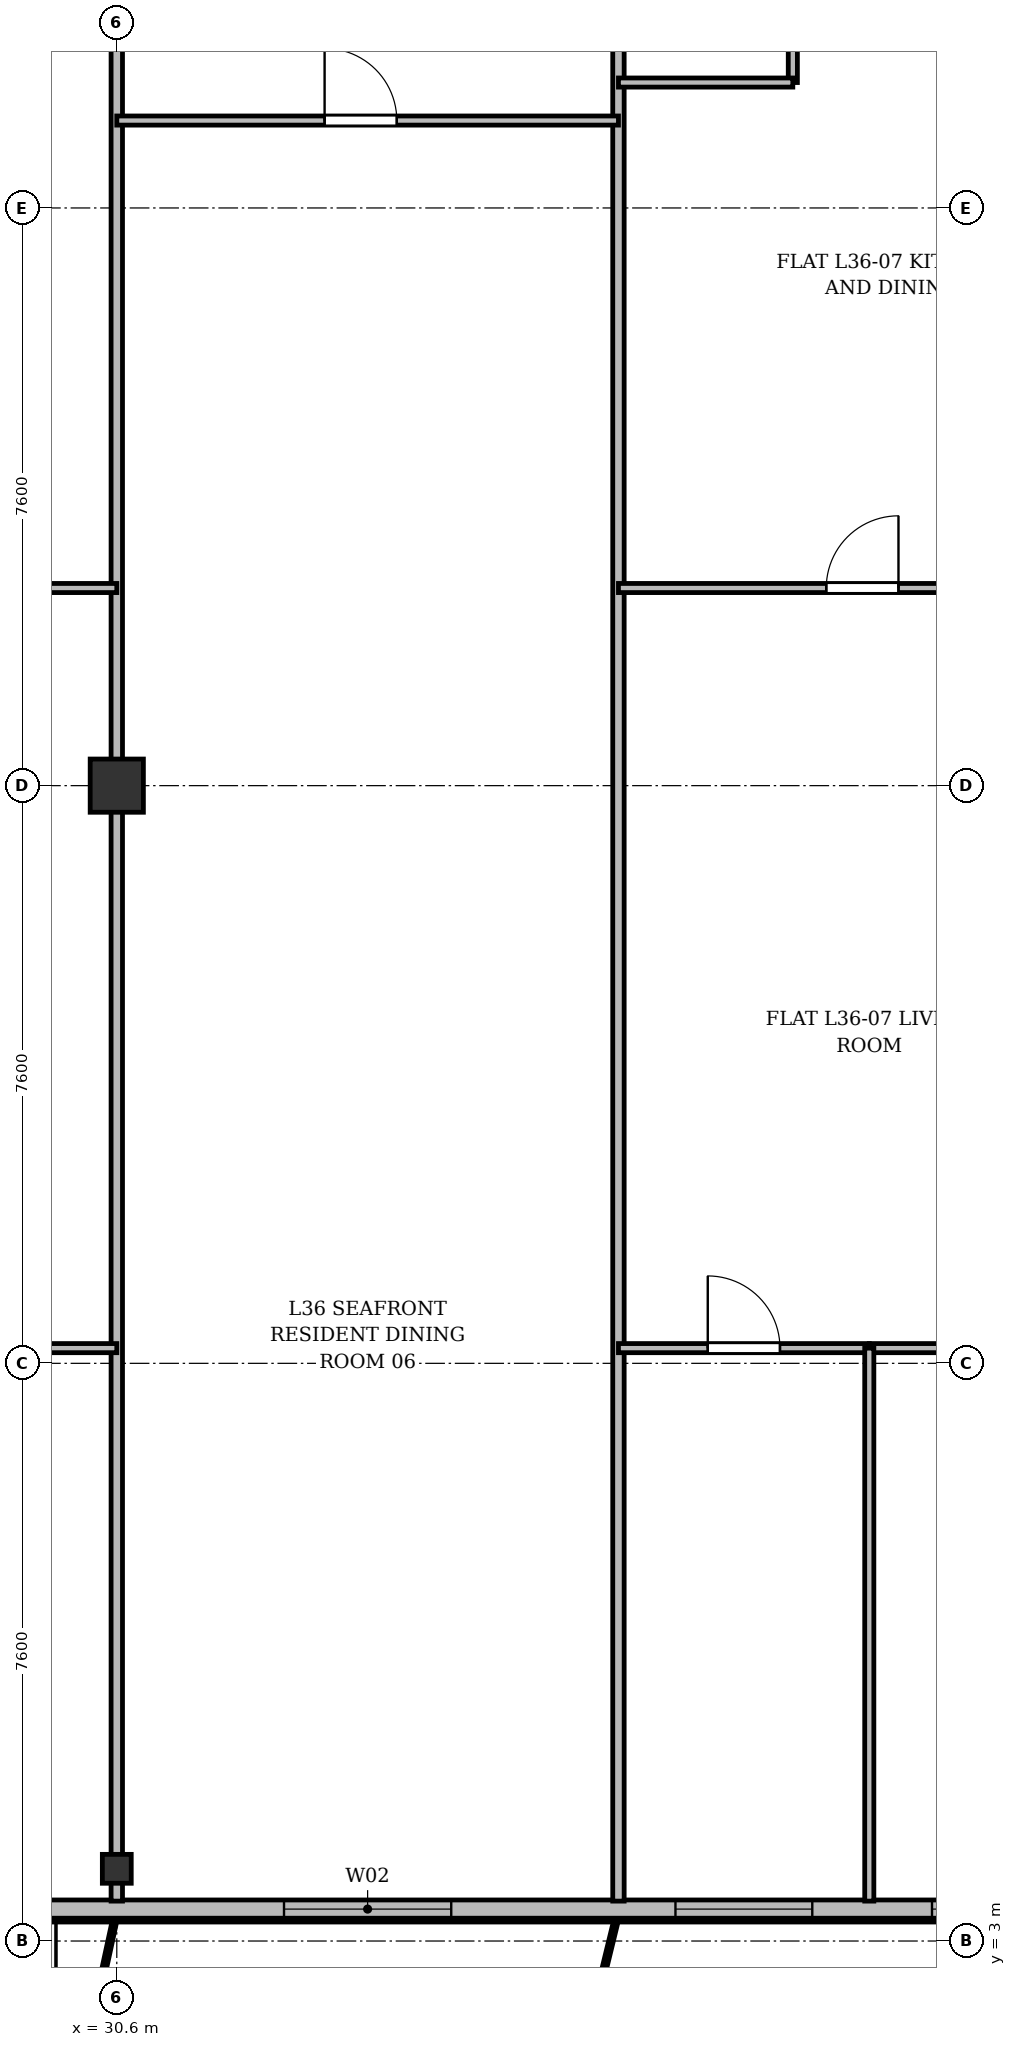
"""IFC4 building model, lengths in metres.
Left out: names, types, materials, properties, quantities, classifications, styles, units other than length and angle.
Written with IfcOpenShell. Run it as: python <this file> out.ifc"""

import sys

from ifc_helpers import new_model, si_unit, direction, frame, frame_2d, origin, origin_2d, place, context, subcontext, project, spatial, rectangle, i_section, extrude, source, transform, mapped, element, fill, save


model = new_model("IFC4")
c1 = context("Model", 3, precision=1e-05, world=origin(), true_north=direction((0.0, 1.0)))
c2 = subcontext(c1, "Body", "Model", "MODEL_VIEW")
j1 = project(units=[si_unit("LENGTHUNIT", "METRE"), si_unit("PLANEANGLEUNIT", "RADIAN")], contexts=[c1])
p1 = place(None, origin())
s1 = spatial("IfcSite", under=j1, at=p1, CompositionType="ELEMENT")
p2 = place(p1, origin())
s2 = spatial("IfcBuilding", under=s1, at=p2, CompositionType="ELEMENT")
p3 = place(p2, frame((0.0, 0.0, 139.3)))
s3 = spatial("IfcBuildingStorey", under=s2, at=p3, CompositionType="ELEMENT", Elevation=139.3)
m1 = source(origin(), c2, "Body", "SweptSolid", [
    extrude(i_section(OverallWidth=0.38, OverallDepth=0.38, WebThickness=0.02, FlangeThickness=0.03, at=origin_2d()), origin(), (0.0, 0.0, 1.0), 3.6),
])
p4 = place(p3, frame((30.6, 3.95, 0.0), z_axis=(0.0, 0.0, 1.0), x_axis=(1.0, 0.0, 0.0)))
e1 = element("IfcColumn", 1, at=p4, inside=s3, PredefinedType="COLUMN", context=c2, shape_type="MappedRepresentation", body=[
    mapped(m1, transform((0.0, 0.0, 0.0), x_axis=(1.0, 0.0, 0.0), y_axis=(0.0, 1.0, 0.0), z_axis=(0.0, 0.0, 1.0), scale=1.0)),
])
m2 = source(origin(), c2, "Body", "SweptSolid", [
    extrude(rectangle(XDim=0.7, YDim=0.7, at=origin_2d()), origin(), (0.0, 0.0, 1.0), 3.6),
])
p5 = place(p3, frame((30.6, 18.2, 0.0), z_axis=(0.0, 0.0, 1.0), x_axis=(1.0, 0.0, 0.0)))
e2 = element("IfcColumn", 2, at=p5, inside=s3, PredefinedType="COLUMN", context=c2, shape_type="MappedRepresentation", body=[
    mapped(m2, transform((0.0, 0.0, 0.0), x_axis=(1.0, 0.0, 0.0), y_axis=(0.0, 1.0, 0.0), z_axis=(0.0, 0.0, 1.0), scale=1.0)),
])
p6 = place(p3, frame((63.6, 3.42, 0.0), z_axis=(0.0, 0.0, 1.0), x_axis=(-1.0, 0.0, 0.0)))
e3 = element("IfcWall", 3, at=p6, inside=s3, PredefinedType="SOLIDWALL", context=c2, shape_type="SweptSolid", body=[
    extrude(rectangle(XDim=52.8, YDim=0.24, at=frame_2d((26.4, 0.0))), origin(), (0.0, 0.0, 1.0), 3.35),
])
p7 = place(p6, frame((0.495, 0.0, 0.9)))
e4 = element("IfcOpeningElement", 4, at=p7, cuts=e3, PredefinedType="OPENING", context=c2, shape_type="SweptSolid", body=[
    extrude(rectangle(XDim=1.5, YDim=1.75, at=frame_2d((0.75, 0.875))), frame((0.0, 0.13, 0.0), z_axis=(0.0, -1.0, 0.0), x_axis=(1.0, 0.0, 0.0)), (0.0, 0.0, 1.0), 0.26),
])
p8 = place(p6, frame((2.9, 0.0, 0.9)))
e5 = element("IfcOpeningElement", 5, at=p8, cuts=e3, PredefinedType="OPENING", context=c2, shape_type="SweptSolid", body=[
    extrude(rectangle(XDim=1.5, YDim=1.75, at=frame_2d((0.75, 0.875))), frame((0.0, 0.13, 0.0), z_axis=(0.0, -1.0, 0.0), x_axis=(1.0, 0.0, 0.0)), (0.0, 0.0, 1.0), 0.26),
])
p9 = place(p6, frame((5.902, 0.0, 0.0)))
e6 = element("IfcOpeningElement", 6, at=p9, cuts=e3, PredefinedType="OPENING", context=c2, shape_type="SweptSolid", body=[
    extrude(rectangle(XDim=1.2, YDim=2.2, at=frame_2d((0.6, 1.1))), frame((0.0, 0.13, 0.0), z_axis=(0.0, -1.0, 0.0), x_axis=(1.0, 0.0, 0.0)), (0.0, 0.0, 1.0), 0.26),
])
p10 = place(p6, frame((7.65, 0.0, 0.9)))
e7 = element("IfcOpeningElement", 7, at=p10, cuts=e3, PredefinedType="OPENING", context=c2, shape_type="SweptSolid", body=[
    extrude(rectangle(XDim=1.5, YDim=1.75, at=frame_2d((0.75, 0.875))), frame((0.0, 0.13, 0.0), z_axis=(0.0, -1.0, 0.0), x_axis=(1.0, 0.0, 0.0)), (0.0, 0.0, 1.0), 0.26),
])
p11 = place(p6, frame((10.1, 0.0, 0.9)))
e8 = element("IfcOpeningElement", 8, at=p11, cuts=e3, PredefinedType="OPENING", context=c2, shape_type="SweptSolid", body=[
    extrude(rectangle(XDim=1.8, YDim=1.8, at=frame_2d((0.9, 0.9))), frame((0.0, 0.13, 0.0), z_axis=(0.0, -1.0, 0.0), x_axis=(1.0, 0.0, 0.0)), (0.0, 0.0, 1.0), 0.26),
])
p12 = place(p6, frame((13.05, 0.0, 0.9)))
e9 = element("IfcOpeningElement", 9, at=p12, cuts=e3, PredefinedType="OPENING", context=c2, shape_type="SweptSolid", body=[
    extrude(rectangle(XDim=1.5, YDim=1.75, at=frame_2d((0.75, 0.875))), frame((0.0, 0.13, 0.0), z_axis=(0.0, -1.0, 0.0), x_axis=(1.0, 0.0, 0.0)), (0.0, 0.0, 1.0), 0.26),
])
p13 = place(p6, frame((15.45, 0.0, 0.9)))
e10 = element("IfcOpeningElement", 10, at=p13, cuts=e3, PredefinedType="OPENING", context=c2, shape_type="SweptSolid", body=[
    extrude(rectangle(XDim=1.5, YDim=1.75, at=frame_2d((0.75, 0.875))), frame((0.0, 0.13, 0.0), z_axis=(0.0, -1.0, 0.0), x_axis=(1.0, 0.0, 0.0)), (0.0, 0.0, 1.0), 0.26),
])
p14 = place(p6, frame((17.6, 0.0, 0.9)))
e11 = element("IfcOpeningElement", 11, at=p14, cuts=e3, PredefinedType="OPENING", context=c2, shape_type="SweptSolid", body=[
    extrude(rectangle(XDim=2.0, YDim=1.95, at=frame_2d((1.0, 0.975))), frame((0.0, 0.13, 0.0), z_axis=(0.0, -1.0, 0.0), x_axis=(1.0, 0.0, 0.0)), (0.0, 0.0, 1.0), 0.26),
])
p15 = place(p6, frame((20.625, 0.0, 0.9)))
e12 = element("IfcOpeningElement", 12, at=p15, cuts=e3, PredefinedType="OPENING", context=c2, shape_type="SweptSolid", body=[
    extrude(rectangle(XDim=1.65, YDim=1.85, at=frame_2d((0.825, 0.925))), frame((0.0, 0.13, 0.0), z_axis=(0.0, -1.0, 0.0), x_axis=(1.0, 0.0, 0.0)), (0.0, 0.0, 1.0), 0.26),
])
p16 = place(p6, frame((23.85, 0.0, 0.9)))
e13 = element("IfcOpeningElement", 13, at=p16, cuts=e3, PredefinedType="OPENING", context=c2, shape_type="SweptSolid", body=[
    extrude(rectangle(XDim=1.8, YDim=1.8, at=frame_2d((0.9, 0.9))), frame((0.0, 0.13, 0.0), z_axis=(0.0, -1.0, 0.0), x_axis=(1.0, 0.0, 0.0)), (0.0, 0.0, 1.0), 0.26),
])
p17 = place(p6, frame((28.6, 0.0, 0.9)))
e14 = element("IfcOpeningElement", 14, at=p17, cuts=e3, PredefinedType="OPENING", context=c2, shape_type="SweptSolid", body=[
    extrude(rectangle(XDim=2.2, YDim=1.8, at=frame_2d((1.1, 0.9))), frame((0.0, 0.13, 0.0), z_axis=(0.0, -1.0, 0.0), x_axis=(1.0, 0.0, 0.0)), (0.0, 0.0, 1.0), 0.26),
])
p18 = place(p6, frame((34.478, 0.0, 0.0)))
e15 = element("IfcOpeningElement", 15, at=p18, cuts=e3, PredefinedType="OPENING", context=c2, shape_type="SweptSolid", body=[
    extrude(rectangle(XDim=1.2, YDim=2.2, at=frame_2d((0.6, 1.1))), frame((0.0, 0.13, 0.0), z_axis=(0.0, -1.0, 0.0), x_axis=(1.0, 0.0, 0.0)), (0.0, 0.0, 1.0), 0.26),
])
p19 = place(p6, frame((37.4, 0.0, 0.9)))
e16 = element("IfcOpeningElement", 16, at=p19, cuts=e3, PredefinedType="OPENING", context=c2, shape_type="SweptSolid", body=[
    extrude(rectangle(XDim=2.0, YDim=1.95, at=frame_2d((1.0, 0.975))), frame((0.0, 0.13, 0.0), z_axis=(0.0, -1.0, 0.0), x_axis=(1.0, 0.0, 0.0)), (0.0, 0.0, 1.0), 0.26),
])
p20 = place(p6, frame((40.975, 0.0, 0.9)))
e17 = element("IfcOpeningElement", 17, at=p20, cuts=e3, PredefinedType="OPENING", context=c2, shape_type="SweptSolid", body=[
    extrude(rectangle(XDim=1.65, YDim=1.85, at=frame_2d((0.825, 0.925))), frame((0.0, 0.13, 0.0), z_axis=(0.0, -1.0, 0.0), x_axis=(1.0, 0.0, 0.0)), (0.0, 0.0, 1.0), 0.26),
])
p21 = place(p6, frame((43.65, 0.0, 0.9)))
e18 = element("IfcOpeningElement", 18, at=p21, cuts=e3, PredefinedType="OPENING", context=c2, shape_type="SweptSolid", body=[
    extrude(rectangle(XDim=1.5, YDim=1.75, at=frame_2d((0.75, 0.875))), frame((0.0, 0.13, 0.0), z_axis=(0.0, -1.0, 0.0), x_axis=(1.0, 0.0, 0.0)), (0.0, 0.0, 1.0), 0.26),
])
p22 = place(p6, frame((45.85, 0.0, 0.9)))
e19 = element("IfcOpeningElement", 19, at=p22, cuts=e3, PredefinedType="OPENING", context=c2, shape_type="SweptSolid", body=[
    extrude(rectangle(XDim=1.5, YDim=1.75, at=frame_2d((0.75, 0.875))), frame((0.0, 0.13, 0.0), z_axis=(0.0, -1.0, 0.0), x_axis=(1.0, 0.0, 0.0)), (0.0, 0.0, 1.0), 0.26),
])
p23 = place(p6, frame((48.25, 0.0, 0.9)))
e20 = element("IfcOpeningElement", 20, at=p23, cuts=e3, PredefinedType="OPENING", context=c2, shape_type="SweptSolid", body=[
    extrude(rectangle(XDim=1.5, YDim=1.75, at=frame_2d((0.75, 0.875))), frame((0.0, 0.13, 0.0), z_axis=(0.0, -1.0, 0.0), x_axis=(1.0, 0.0, 0.0)), (0.0, 0.0, 1.0), 0.26),
])
p24 = place(p6, frame((50.455, 0.0, 0.9)))
e21 = element("IfcOpeningElement", 21, at=p24, cuts=e3, PredefinedType="OPENING", context=c2, shape_type="SweptSolid", body=[
    extrude(rectangle(XDim=2.0, YDim=1.95, at=frame_2d((1.0, 0.975))), frame((0.0, 0.13, 0.0), z_axis=(0.0, -1.0, 0.0), x_axis=(1.0, 0.0, 0.0)), (0.0, 0.0, 1.0), 0.26),
])
p25 = place(p3, frame((30.6, 3.525, 0.0), z_axis=(0.0, 0.0, 1.0), x_axis=(0.0, 1.0, 0.0)))
e22 = element("IfcWall", 22, at=p25, inside=s3, PredefinedType="PARTITIONING", context=c2, shape_type="SweptSolid", body=[
    extrude(rectangle(XDim=27.275, YDim=0.15, at=frame_2d((13.638, 0.0))), origin(), (0.0, 0.0, 1.0), 2.85),
])
p26 = place(p3, frame((37.2, 3.525, 0.0), z_axis=(0.0, 0.0, 1.0), x_axis=(0.0, 1.0, 0.0)))
e23 = element("IfcWall", 23, at=p26, inside=s3, PredefinedType="PARTITIONING", context=c2, shape_type="SweptSolid", body=[
    extrude(rectangle(XDim=27.275, YDim=0.15, at=frame_2d((13.638, 0.0))), origin(), (0.0, 0.0, 1.0), 2.75),
])
p27 = place(p3, frame((23.4, 20.8, 0.0), z_axis=(0.0, 0.0, 1.0), x_axis=(1.0, 0.0, 0.0)))
e24 = element("IfcWall", 24, at=p27, inside=s3, PredefinedType="PARTITIONING", context=c2, shape_type="SweptSolid", body=[
    extrude(rectangle(XDim=7.2, YDim=0.12, at=frame_2d((3.6, 0.0))), origin(), (0.0, 0.0, 1.0), 2.85),
])
p28 = place(p27, frame((3.125, 0.0, 0.0)))
e25 = element("IfcOpeningElement", 25, at=p28, cuts=e24, PredefinedType="OPENING", context=c2, shape_type="SweptSolid", body=[
    extrude(rectangle(XDim=0.95, YDim=2.15, at=frame_2d((0.475, 1.075))), frame((0.0, 0.07, 0.0), z_axis=(0.0, -1.0, 0.0), x_axis=(1.0, 0.0, 0.0)), (0.0, 0.0, 1.0), 0.14),
])
p29 = place(p3, frame((27.0, 10.8, 0.0), z_axis=(0.0, 0.0, 1.0), x_axis=(1.0, 0.0, 0.0)))
e26 = element("IfcWall", 26, at=p29, inside=s3, PredefinedType="PARTITIONING", context=c2, shape_type="SweptSolid", body=[
    extrude(rectangle(XDim=3.6, YDim=0.12, at=frame_2d((1.8, 0.0))), origin(), (0.0, 0.0, 1.0), 2.85),
])
p30 = place(p29, frame((1.325, 0.0, 0.0)))
e27 = element("IfcOpeningElement", 27, at=p30, cuts=e26, PredefinedType="OPENING", context=c2, shape_type="SweptSolid", body=[
    extrude(rectangle(XDim=0.95, YDim=2.15, at=frame_2d((0.475, 1.075))), frame((0.0, 0.07, 0.0), z_axis=(0.0, -1.0, 0.0), x_axis=(1.0, 0.0, 0.0)), (0.0, 0.0, 1.0), 0.14),
])
p31 = place(p3, frame((30.6, 26.95, 0.0), z_axis=(0.0, 0.0, 1.0), x_axis=(1.0, 0.0, 0.0)))
e28 = element("IfcWall", 28, at=p31, inside=s3, PredefinedType="PARTITIONING", context=c2, shape_type="SweptSolid", body=[
    extrude(rectangle(XDim=6.6, YDim=0.12, at=frame_2d((3.3, 0.0))), origin(), (0.0, 0.0, 1.0), 2.85),
])
p32 = place(p31, frame((2.734, 0.0, 0.0)))
e29 = element("IfcOpeningElement", 29, at=p32, cuts=e28, PredefinedType="OPENING", context=c2, shape_type="SweptSolid", body=[
    extrude(rectangle(XDim=0.95, YDim=2.15, at=frame_2d((0.475, 1.075))), frame((0.0, 0.07, 0.0), z_axis=(0.0, -1.0, 0.0), x_axis=(1.0, 0.0, 0.0)), (0.0, 0.0, 1.0), 0.14),
])
p33 = place(p3, frame((37.2, 20.8, 0.0), z_axis=(0.0, 0.0, 1.0), x_axis=(1.0, 0.0, 0.0)))
e30 = element("IfcWall", 30, at=p33, inside=s3, PredefinedType="PARTITIONING", context=c2, shape_type="SweptSolid", body=[
    extrude(rectangle(XDim=6.6, YDim=0.12, at=frame_2d((3.3, 0.0))), origin(), (0.0, 0.0, 1.0), 2.85),
])
p34 = place(p33, frame((2.734, 0.0, 0.0)))
e31 = element("IfcOpeningElement", 31, at=p34, cuts=e30, PredefinedType="OPENING", context=c2, shape_type="SweptSolid", body=[
    extrude(rectangle(XDim=0.95, YDim=2.15, at=frame_2d((0.475, 1.075))), frame((0.0, 0.07, 0.0), z_axis=(0.0, -1.0, 0.0), x_axis=(1.0, 0.0, 0.0)), (0.0, 0.0, 1.0), 0.14),
])
p35 = place(p3, frame((39.494, 27.45, 0.0), z_axis=(0.0, 0.0, 1.0), x_axis=(0.0, 1.0, 0.0)))
e32 = element("IfcWall", 32, at=p35, inside=s3, PredefinedType="PARTITIONING", context=c2, shape_type="SweptSolid", body=[
    extrude(rectangle(XDim=3.35, YDim=0.12, at=frame_2d((1.675, 0.0))), origin(), (0.0, 0.0, 1.0), 3.35),
])
p36 = place(p35, frame((0.8, 0.0, 0.0)))
e33 = element("IfcOpeningElement", 33, at=p36, cuts=e32, PredefinedType="OPENING", context=c2, shape_type="SweptSolid", body=[
    extrude(rectangle(XDim=0.85, YDim=2.1, at=frame_2d((0.425, 1.05))), frame((0.0, 0.07, 0.0), z_axis=(0.0, -1.0, 0.0), x_axis=(1.0, 0.0, 0.0)), (0.0, 0.0, 1.0), 0.14),
])
p37 = place(p3, frame((37.2, 27.45, 0.0), z_axis=(0.0, 0.0, 1.0), x_axis=(1.0, 0.0, 0.0)))
e34 = element("IfcWall", 34, at=p37, inside=s3, PredefinedType="PARTITIONING", context=c2, shape_type="SweptSolid", body=[
    extrude(rectangle(XDim=2.294, YDim=0.12, at=frame_2d((1.147, 0.0))), origin(), (0.0, 0.0, 1.0), 3.35),
])
p38 = place(p3, frame((37.2, 10.8, 0.0), z_axis=(0.0, 0.0, 1.0), x_axis=(1.0, 0.0, 0.0)))
e35 = element("IfcWall", 35, at=p38, inside=s3, PredefinedType="PARTITIONING", context=c2, shape_type="SweptSolid", body=[
    extrude(rectangle(XDim=3.3, YDim=0.12, at=frame_2d((1.65, 0.0))), origin(), (0.0, 0.0, 1.0), 3.0),
])
p39 = place(p38, frame((1.175, 0.0, 0.0)))
e36 = element("IfcOpeningElement", 36, at=p39, cuts=e35, PredefinedType="OPENING", context=c2, shape_type="SweptSolid", body=[
    extrude(rectangle(XDim=0.95, YDim=2.15, at=frame_2d((0.475, 1.075))), frame((0.0, 0.07, 0.0), z_axis=(0.0, -1.0, 0.0), x_axis=(1.0, 0.0, 0.0)), (0.0, 0.0, 1.0), 0.14),
])
p40 = place(p3, frame((40.5, 10.8, 0.0), z_axis=(0.0, 0.0, 1.0), x_axis=(1.0, 0.0, 0.0)))
e37 = element("IfcWall", 37, at=p40, inside=s3, PredefinedType="PARTITIONING", context=c2, shape_type="SweptSolid", body=[
    extrude(rectangle(XDim=3.3, YDim=0.12, at=frame_2d((1.65, 0.0))), origin(), (0.0, 0.0, 1.0), 2.85),
])
p41 = place(p40, frame((1.175, 0.0, 0.0)))
e38 = element("IfcOpeningElement", 38, at=p41, cuts=e37, PredefinedType="OPENING", context=c2, shape_type="SweptSolid", body=[
    extrude(rectangle(XDim=0.95, YDim=2.15, at=frame_2d((0.475, 1.075))), frame((0.0, 0.07, 0.0), z_axis=(0.0, -1.0, 0.0), x_axis=(1.0, 0.0, 0.0)), (0.0, 0.0, 1.0), 0.14),
])
p42 = place(p3, frame((40.5, 3.525, 0.0), z_axis=(0.0, 0.0, 1.0), x_axis=(0.0, 1.0, 0.0)))
e39 = element("IfcWall", 39, at=p42, inside=s3, PredefinedType="PARTITIONING", context=c2, shape_type="SweptSolid", body=[
    extrude(rectangle(XDim=7.275, YDim=0.12, at=frame_2d((3.638, 0.0))), origin(), (0.0, 0.0, 1.0), 2.75),
])
m3 = source(origin(), c2, "Body", "SweptSolid", [
    extrude(rectangle(XDim=1.65, YDim=1.85, at=frame_2d((0.825, 0.925))), frame((0.0, 0.03, 0.0), z_axis=(0.0, -1.0, 0.0), x_axis=(1.0, 0.0, 0.0)), (0.0, 0.0, 1.0), 0.06),
])
p43 = place(p15, origin())
e40 = element("IfcWindow", 40, at=p43, inside=s3, PartitioningType="SINGLE_PANEL", PredefinedType="WINDOW", context=c2, shape_type="MappedRepresentation", body=[
    mapped(m3, transform((0.0, 0.0, 0.0), x_axis=(1.0, 0.0, 0.0), y_axis=(0.0, 1.0, 0.0), z_axis=(0.0, 0.0, 1.0), scale=1.0)),
])
fill(e12, e40)
m4 = source(origin(), c2, "Body", "SweptSolid", [
    extrude(rectangle(XDim=1.8, YDim=1.8, at=frame_2d((0.9, 0.9))), frame((0.0, 0.03, 0.0), z_axis=(0.0, -1.0, 0.0), x_axis=(1.0, 0.0, 0.0)), (0.0, 0.0, 1.0), 0.06),
])
p44 = place(p16, origin())
e41 = element("IfcWindow", 41, at=p44, inside=s3, PartitioningType="SINGLE_PANEL", PredefinedType="WINDOW", context=c2, shape_type="MappedRepresentation", body=[
    mapped(m4, transform((0.0, 0.0, 0.0), x_axis=(1.0, 0.0, 0.0), y_axis=(0.0, 1.0, 0.0), z_axis=(0.0, 0.0, 1.0), scale=1.0)),
])
fill(e13, e41)
m5 = source(origin(), c2, "Body", "SweptSolid", [
    extrude(rectangle(XDim=2.2, YDim=1.8, at=frame_2d((1.1, 0.9))), frame((0.0, 0.03, 0.0), z_axis=(0.0, -1.0, 0.0), x_axis=(1.0, 0.0, 0.0)), (0.0, 0.0, 1.0), 0.06),
])
p45 = place(p17, origin())
e42 = element("IfcWindow", 42, at=p45, inside=s3, PartitioningType="SINGLE_PANEL", PredefinedType="WINDOW", context=c2, shape_type="MappedRepresentation", body=[
    mapped(m5, transform((0.0, 0.0, 0.0), x_axis=(1.0, 0.0, 0.0), y_axis=(0.0, 1.0, 0.0), z_axis=(0.0, 0.0, 1.0), scale=1.0)),
])
fill(e14, e42)
m6 = source(origin(), c2, "Body", "SweptSolid", [
    extrude(rectangle(XDim=0.95, YDim=2.15, at=frame_2d((0.475, 1.075))), frame((0.0, 0.025, 0.0), z_axis=(0.0, -1.0, 0.0), x_axis=(1.0, 0.0, 0.0)), (0.0, 0.0, 1.0), 0.05),
])
p46 = place(p32, origin())
e43 = element("IfcDoor", 43, at=p46, inside=s3, OperationType="SINGLE_SWING_LEFT", PredefinedType="DOOR", context=c2, shape_type="MappedRepresentation", body=[
    mapped(m6, transform((0.0, 0.0, 0.0), x_axis=(1.0, 0.0, 0.0), y_axis=(0.0, 1.0, 0.0), z_axis=(0.0, 0.0, 1.0), scale=1.0)),
])
fill(e29, e43)
p47 = place(p34, origin())
e44 = element("IfcDoor", 44, at=p47, inside=s3, OperationType="SINGLE_SWING_RIGHT", PredefinedType="DOOR", context=c2, shape_type="MappedRepresentation", body=[
    mapped(m6, transform((0.0, 0.0, 0.0), x_axis=(1.0, 0.0, 0.0), y_axis=(0.0, 1.0, 0.0), z_axis=(0.0, 0.0, 1.0), scale=1.0)),
])
fill(e31, e44)
p48 = place(p39, origin())
e45 = element("IfcDoor", 45, at=p48, inside=s3, OperationType="SINGLE_SWING_LEFT", PredefinedType="DOOR", context=c2, shape_type="MappedRepresentation", body=[
    mapped(m6, transform((0.0, 0.0, 0.0), x_axis=(1.0, 0.0, 0.0), y_axis=(0.0, 1.0, 0.0), z_axis=(0.0, 0.0, 1.0), scale=1.0)),
])
fill(e36, e45)
save(model, sys.argv[1])
